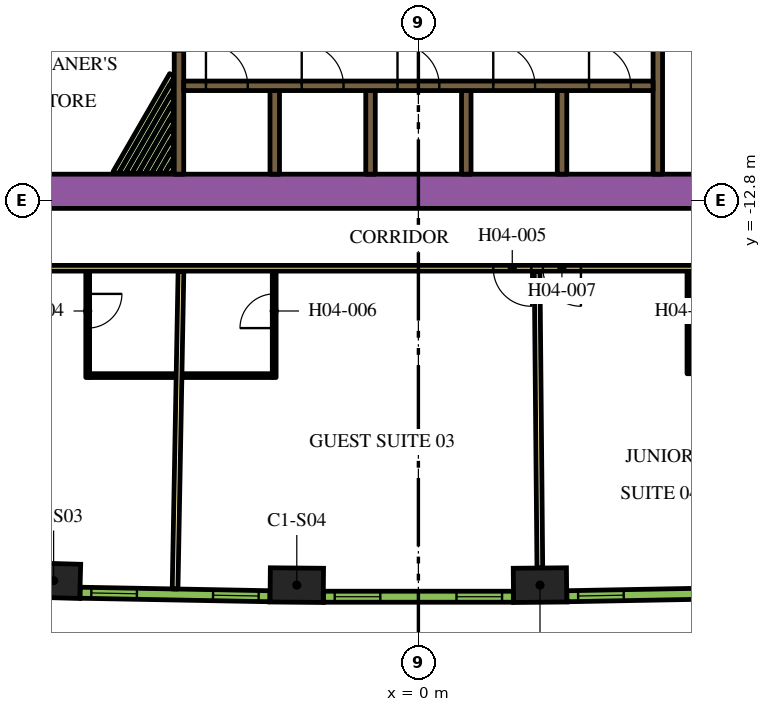
"""IFC4 building model, lengths in metres.
Left out: names, types, materials, properties, quantities, classifications, styles, units other than length and angle.
Written with IfcOpenShell. Run it as: python <this file> out.ifc"""

import sys

from ifc_helpers import new_model, si_unit, direction, frame, frame_2d, origin, origin_2d, place, context, subcontext, project, spatial, rectangle, extrude, element, fill, save


model = new_model("IFC4")
c1 = context("Model", 3, precision=1e-05, world=origin(), true_north=direction((0.0, 1.0)))
c2 = subcontext(c1, "Body", "Model", "MODEL_VIEW")
j1 = project(units=[si_unit("LENGTHUNIT", "METRE"), si_unit("PLANEANGLEUNIT", "RADIAN")], contexts=[c1])
p1 = place(None, origin())
s1 = spatial("IfcSite", under=j1, at=p1, CompositionType="ELEMENT")
p2 = place(p1, origin())
s2 = spatial("IfcBuilding", under=s1, at=p2, CompositionType="ELEMENT")
p3 = place(p2, frame((0.0, 0.0, 66.6)))
s3 = spatial("IfcBuildingStorey", under=s2, at=p3, CompositionType="ELEMENT", Elevation=66.6)
for number, where, z_axis, x_axis in (
    (1, (-9.599, -22.795, 0.0), (0.0, 0.0, 1.0), (1.0, -0.028, 0.0)),
    (2, (-3.2, -22.913, 0.0), (0.0, 0.0, 1.0), (1.0, -0.009, 0.0)),
    (3, (3.2, -22.913, 0.0), (0.0, 0.0, 1.0), (1.0, 0.009, 0.0)),
):
    element("IfcColumn", number, at=place(p3, frame(where, z_axis=z_axis, x_axis=x_axis)), inside=s3, PredefinedType="COLUMN", context=c2, shape_type="SweptSolid", body=[
        extrude(rectangle(XDim=1.4, YDim=0.9, at=origin_2d()), origin(), (0.0, 0.0, 1.0), 3.9),
    ])
p4 = place(p3, frame((-12.019, -12.55, 0.0), z_axis=(0.0, 0.0, 1.0), x_axis=(1.0, 0.0, 0.0)))
e4 = element("IfcWall", 4, at=p4, inside=s3, PredefinedType="SOLIDWALL", context=c2, shape_type="SweptSolid", body=[
    extrude(rectangle(XDim=21.63, YDim=0.9, at=frame_2d((10.815, 0.0))), origin(), (0.0, 0.0, 1.0), 3.9),
])
p5 = place(p3, frame((12.84, -9.261, 0.0), z_axis=(0.0, 0.0, 1.0), x_axis=(-0.866013990052, 0.500019768644, 0.0)))
e5 = element("IfcWall", 5, at=p5, inside=s3, PredefinedType="SOLIDWALL", context=c2, shape_type="SweptSolid", body=[
    extrude(rectangle(XDim=6.8, YDim=0.25, at=frame_2d((3.4, 0.0))), origin(), (0.0, 0.0, 1.0), 3.9),
])
p6 = place(p3, frame((-12.84, -9.261, 0.0), z_axis=(0.0, 0.0, 1.0), x_axis=(0.866016039709, 0.500016218704, 0.0)))
e6 = element("IfcWall", 6, at=p6, inside=s3, PredefinedType="SOLIDWALL", context=c2, shape_type="SweptSolid", body=[
    extrude(rectangle(XDim=7.05, YDim=0.25, at=frame_2d((3.525, 0.0))), origin(), (0.0, 0.0, 1.0), 3.9),
])
p7 = place(p3, frame((-3.78, -12.1, 0.0), z_axis=(0.0, 0.0, 1.0), x_axis=(0.0, 1.0, 0.0)))
e7 = element("IfcWall", 7, at=p7, inside=s3, PredefinedType="SOLIDWALL", context=c2, shape_type="SweptSolid", body=[
    extrude(rectangle(XDim=2.2, YDim=0.25, at=frame_2d((1.1, 0.0))), origin(), (0.0, 0.0, 1.0), 3.9),
])
p8 = place(p3, frame((-6.3, -12.1, 0.0), z_axis=(0.0, 0.0, 1.0), x_axis=(0.0, 1.0, 0.0)))
e8 = element("IfcWall", 8, at=p8, inside=s3, PredefinedType="SOLIDWALL", context=c2, shape_type="SweptSolid", body=[
    extrude(rectangle(XDim=3.265, YDim=0.25, at=frame_2d((1.632, 0.0))), origin(), (0.0, 0.0, 1.0), 3.9),
])
p9 = place(p3, frame((6.3, -12.1, 0.0), z_axis=(0.0, 0.0, 1.0), x_axis=(0.0, 1.0, 0.0)))
e9 = element("IfcWall", 9, at=p9, inside=s3, PredefinedType="SOLIDWALL", context=c2, shape_type="SweptSolid", body=[
    extrude(rectangle(XDim=3.428, YDim=0.25, at=frame_2d((1.714, 0.0))), origin(), (0.0, 0.0, 1.0), 3.9),
])
for number, where, z_axis, x_axis in (
    (10, (3.78, -12.1, 0.0), (0.0, 0.0, 1.0), (0.0, 1.0, 0.0)),
    (11, (1.26, -12.1, 0.0), (0.0, 0.0, 1.0), (0.0, 1.0, 0.0)),
    (12, (-1.26, -12.1, 0.0), (0.0, 0.0, 1.0), (0.0, 1.0, 0.0)),
):
    element("IfcWall", number, at=place(p3, frame(where, z_axis=z_axis, x_axis=x_axis)), inside=s3, PredefinedType="SOLIDWALL", context=c2, shape_type="SweptSolid", body=[
        extrude(rectangle(XDim=2.2, YDim=0.25, at=frame_2d((1.1, 0.0))), origin(), (0.0, 0.0, 1.0), 3.9),
    ])
p10 = place(p3, frame((-7.968, -12.068, 0.0), z_axis=(0.0, 0.0, 1.0), x_axis=(0.500013701029, 0.866017493347, 0.0)))
e13 = element("IfcWall", 13, at=p10, inside=s3, PredefinedType="PARTITIONING", context=c2, shape_type="SweptSolid", body=[
    extrude(rectangle(XDim=2.975, YDim=0.15, at=frame_2d((1.488, 0.0))), origin(), (0.0, 0.0, 1.0), 2.75),
])
p11 = place(p3, frame((-7.794, -12.068, 0.0), z_axis=(0.0, 0.0, 1.0), x_axis=(0.499985098601, 0.86603400694, 0.0)))
e14 = element("IfcWall", 14, at=p11, inside=s3, PredefinedType="PARTITIONING", context=c2, shape_type="SweptSolid", body=[
    extrude(rectangle(XDim=2.628, YDim=0.15, at=frame_2d((1.314, 0.0))), origin(), (0.0, 0.0, 1.0), 2.75),
])
p12 = place(p3, frame((-7.621, -12.068, 0.0), z_axis=(0.0, 0.0, 1.0), x_axis=(0.500028047758, 0.866009209798, 0.0)))
e15 = element("IfcWall", 15, at=p12, inside=s3, PredefinedType="PARTITIONING", context=c2, shape_type="SweptSolid", body=[
    extrude(rectangle(XDim=2.282, YDim=0.15, at=frame_2d((1.141, 0.0))), origin(), (0.0, 0.0, 1.0), 2.75),
])
p13 = place(p3, frame((-7.448, -12.068, 0.0), z_axis=(0.0, 0.0, 1.0), x_axis=(0.500031751504, 0.866007071269, 0.0)))
e16 = element("IfcWall", 16, at=p13, inside=s3, PredefinedType="PARTITIONING", context=c2, shape_type="SweptSolid", body=[
    extrude(rectangle(XDim=1.936, YDim=0.15, at=frame_2d((0.968, 0.0))), origin(), (0.0, 0.0, 1.0), 2.75),
])
p14 = place(p3, frame((-7.275, -12.068, 0.0), z_axis=(0.0, 0.0, 1.0), x_axis=(0.499988385283, 0.86603210944, 0.0)))
e17 = element("IfcWall", 17, at=p14, inside=s3, PredefinedType="PARTITIONING", context=c2, shape_type="SweptSolid", body=[
    extrude(rectangle(XDim=1.589, YDim=0.15, at=frame_2d((0.795, 0.0))), origin(), (0.0, 0.0, 1.0), 2.75),
])
p15 = place(p3, frame((-7.102, -12.068, 0.0), z_axis=(0.0, 0.0, 1.0), x_axis=(0.500068153333, 0.865986051864, 0.0)))
e18 = element("IfcWall", 18, at=p15, inside=s3, PredefinedType="PARTITIONING", context=c2, shape_type="SweptSolid", body=[
    extrude(rectangle(XDim=1.243, YDim=0.15, at=frame_2d((0.622, 0.0))), origin(), (0.0, 0.0, 1.0), 2.75),
])
p16 = place(p3, frame((-6.928, -12.068, 0.0), z_axis=(0.0, 0.0, 1.0), x_axis=(0.500005339912, 0.866022320763, 0.0)))
e19 = element("IfcWall", 19, at=p16, inside=s3, PredefinedType="PARTITIONING", context=c2, shape_type="SweptSolid", body=[
    extrude(rectangle(XDim=0.896, YDim=0.15, at=frame_2d((0.448, 0.0))), origin(), (0.0, 0.0, 1.0), 2.75),
])
p17 = place(p3, frame((-6.755, -12.068, 0.0), z_axis=(0.0, 0.0, 1.0), x_axis=(0.500196256984, 0.865912065108, 0.0)))
e20 = element("IfcWall", 20, at=p17, inside=s3, PredefinedType="PARTITIONING", context=c2, shape_type="SweptSolid", body=[
    extrude(rectangle(XDim=0.55, YDim=0.15, at=frame_2d((0.275, 0.0))), origin(), (0.0, 0.0, 1.0), 2.75),
])
p18 = place(p3, frame((-6.582, -12.068, 0.0), z_axis=(0.0, 0.0, 1.0), x_axis=(0.499618727529, 0.866245419672, 0.0)))
e21 = element("IfcWall", 21, at=p18, inside=s3, PredefinedType="PARTITIONING", context=c2, shape_type="SweptSolid", body=[
    extrude(rectangle(XDim=0.204, YDim=0.15, at=frame_2d((0.102, 0.0))), origin(), (0.0, 0.0, 1.0), 2.75),
])
p19 = place(p3, frame((-6.175, -9.775, 0.0), z_axis=(0.0, 0.0, 1.0), x_axis=(1.0, 0.0, 0.0)))
e22 = element("IfcWall", 22, at=p19, inside=s3, PredefinedType="SOLIDWALL", context=c2, shape_type="SweptSolid", body=[
    extrude(rectangle(XDim=12.35, YDim=0.25, at=frame_2d((6.175, 0.0))), origin(), (0.0, 0.0, 1.0), 3.9),
])
p20 = place(p19, frame((0.585, 0.0, 0.0)))
e23 = element("IfcOpeningElement", 23, at=p20, cuts=e22, PredefinedType="OPENING", context=c2, shape_type="SweptSolid", body=[
    extrude(rectangle(XDim=1.1, YDim=2.1, at=frame_2d((0.55, 1.05))), frame((0.0, 0.135, 0.0), z_axis=(0.0, -1.0, 0.0), x_axis=(1.0, 0.0, 0.0)), (0.0, 0.0, 1.0), 0.27),
])
p21 = place(p19, frame((3.105, 0.0, 0.0)))
e24 = element("IfcOpeningElement", 24, at=p21, cuts=e22, PredefinedType="OPENING", context=c2, shape_type="SweptSolid", body=[
    extrude(rectangle(XDim=1.1, YDim=2.1, at=frame_2d((0.55, 1.05))), frame((0.0, 0.135, 0.0), z_axis=(0.0, -1.0, 0.0), x_axis=(1.0, 0.0, 0.0)), (0.0, 0.0, 1.0), 0.27),
])
p22 = place(p19, frame((5.625, 0.0, 0.0)))
e25 = element("IfcOpeningElement", 25, at=p22, cuts=e22, PredefinedType="OPENING", context=c2, shape_type="SweptSolid", body=[
    extrude(rectangle(XDim=1.1, YDim=2.1, at=frame_2d((0.55, 1.05))), frame((0.0, 0.135, 0.0), z_axis=(0.0, -1.0, 0.0), x_axis=(1.0, 0.0, 0.0)), (0.0, 0.0, 1.0), 0.27),
])
p23 = place(p19, frame((8.145, 0.0, 0.0)))
e26 = element("IfcOpeningElement", 26, at=p23, cuts=e22, PredefinedType="OPENING", context=c2, shape_type="SweptSolid", body=[
    extrude(rectangle(XDim=1.1, YDim=2.1, at=frame_2d((0.55, 1.05))), frame((0.0, 0.135, 0.0), z_axis=(0.0, -1.0, 0.0), x_axis=(1.0, 0.0, 0.0)), (0.0, 0.0, 1.0), 0.27),
])
p24 = place(p19, frame((10.665, 0.0, 0.0)))
e27 = element("IfcOpeningElement", 27, at=p24, cuts=e22, PredefinedType="OPENING", context=c2, shape_type="SweptSolid", body=[
    extrude(rectangle(XDim=1.1, YDim=2.1, at=frame_2d((0.55, 1.05))), frame((0.0, 0.135, 0.0), z_axis=(0.0, -1.0, 0.0), x_axis=(1.0, 0.0, 0.0)), (0.0, 0.0, 1.0), 0.27),
])
p25 = place(p3, frame((12.918, -14.575, 0.0), z_axis=(0.0, 0.0, 1.0), x_axis=(-1.0, 0.0, 0.0)))
e28 = element("IfcWall", 28, at=p25, inside=s3, PredefinedType="PARTITIONING", context=c2, shape_type="SweptSolid", body=[
    extrude(rectangle(XDim=25.766, YDim=0.15, at=frame_2d((12.883, 0.0))), origin(), (0.0, 0.0, 1.0), 2.75),
])
p26 = place(p25, frame((24.586, 0.0, 0.0)))
e29 = element("IfcOpeningElement", 29, at=p26, cuts=e28, PredefinedType="OPENING", context=c2, shape_type="SweptSolid", body=[
    extrude(rectangle(XDim=1.0, YDim=2.1, at=frame_2d((0.5, 1.05))), frame((0.0, 0.085, 0.0), z_axis=(0.0, -1.0, 0.0), x_axis=(1.0, 0.0, 0.0)), (0.0, 0.0, 1.0), 0.17),
])
p27 = place(p25, frame((9.948, 0.0, 0.0)))
e30 = element("IfcOpeningElement", 30, at=p27, cuts=e28, PredefinedType="OPENING", context=c2, shape_type="SweptSolid", body=[
    extrude(rectangle(XDim=1.0, YDim=2.1, at=frame_2d((0.5, 1.05))), frame((0.0, 0.085, 0.0), z_axis=(0.0, -1.0, 0.0), x_axis=(1.0, 0.0, 0.0)), (0.0, 0.0, 1.0), 0.17),
])
p28 = place(p25, frame((8.642, 0.0, 0.0)))
e31 = element("IfcOpeningElement", 31, at=p28, cuts=e28, PredefinedType="OPENING", context=c2, shape_type="SweptSolid", body=[
    extrude(rectangle(XDim=1.0, YDim=2.1, at=frame_2d((0.5, 1.05))), frame((0.0, 0.085, 0.0), z_axis=(0.0, -1.0, 0.0), x_axis=(1.0, 0.0, 0.0)), (0.0, 0.0, 1.0), 0.17),
])
p29 = place(p25, frame((0.18, 0.0, 0.0)))
e32 = element("IfcOpeningElement", 32, at=p29, cuts=e28, PredefinedType="OPENING", context=c2, shape_type="SweptSolid", body=[
    extrude(rectangle(XDim=1.0, YDim=2.1, at=frame_2d((0.5, 1.05))), frame((0.0, 0.085, 0.0), z_axis=(0.0, -1.0, 0.0), x_axis=(1.0, 0.0, 0.0)), (0.0, 0.0, 1.0), 0.17),
])
p30 = place(p3, frame((-6.402, -23.014, 0.0), z_axis=(0.0, 0.0, 1.0), x_axis=(0.01849587109, 0.999828936745, 0.0)))
e33 = element("IfcWall", 33, at=p30, inside=s3, PredefinedType="PARTITIONING", context=c2, shape_type="SweptSolid", body=[
    extrude(rectangle(XDim=8.355, YDim=0.15, at=frame_2d((4.178, 0.0))), origin(), (0.0, 0.0, 1.0), 2.75),
])
p31 = place(p3, frame((3.196, -22.463, 0.0), z_axis=(0.0, 0.0, 1.0), x_axis=(-0.00926060032, 0.999957119721, 0.0)))
e34 = element("IfcWall", 34, at=p31, inside=s3, PredefinedType="PARTITIONING", context=c2, shape_type="SweptSolid", body=[
    extrude(rectangle(XDim=7.803, YDim=0.15, at=frame_2d((3.902, 0.0))), origin(), (0.0, 0.0, 1.0), 2.75),
])
p32 = place(p3, frame((-8.702, -14.65, 0.0), z_axis=(0.0, 0.0, 1.0), x_axis=(0.0, -1.0, 0.0)))
e35 = element("IfcWall", 35, at=p32, inside=s3, PredefinedType="PARTITIONING", context=c2, shape_type="SweptSolid", body=[
    extrude(rectangle(XDim=2.8, YDim=0.1, at=frame_2d((1.4, 0.0))), origin(), (0.0, 0.0, 1.0), 2.75),
])
p33 = place(p32, frame((0.6, 0.0, 0.0)))
e36 = element("IfcOpeningElement", 36, at=p33, cuts=e35, PredefinedType="OPENING", context=c2, shape_type="SweptSolid", body=[
    extrude(rectangle(XDim=0.9, YDim=2.1, at=frame_2d((0.45, 1.05))), frame((0.0, 0.06, 0.0), z_axis=(0.0, -1.0, 0.0), x_axis=(1.0, 0.0, 0.0)), (0.0, 0.0, 1.0), 0.12),
])
p34 = place(p3, frame((-8.652, -17.4, 0.0), z_axis=(0.0, 0.0, 1.0), x_axis=(1.0, 0.0, 0.0)))
e37 = element("IfcWall", 37, at=p34, inside=s3, PredefinedType="PARTITIONING", context=c2, shape_type="SweptSolid", body=[
    extrude(rectangle(XDim=2.27, YDim=0.1, at=frame_2d((1.135, 0.0))), origin(), (0.0, 0.0, 1.0), 2.75),
])
p35 = place(p3, frame((-3.794, -17.45, 0.0), z_axis=(0.0, 0.0, 1.0), x_axis=(0.0, 1.0, 0.0)))
e38 = element("IfcWall", 38, at=p35, inside=s3, PredefinedType="PARTITIONING", context=c2, shape_type="SweptSolid", body=[
    extrude(rectangle(XDim=2.8, YDim=0.1, at=frame_2d((1.4, 0.0))), origin(), (0.0, 0.0, 1.0), 2.75),
])
p36 = place(p35, frame((1.3, 0.0, 0.0)))
e39 = element("IfcOpeningElement", 39, at=p36, cuts=e38, PredefinedType="OPENING", context=c2, shape_type="SweptSolid", body=[
    extrude(rectangle(XDim=0.9, YDim=2.1, at=frame_2d((0.45, 1.05))), frame((0.0, 0.06, 0.0), z_axis=(0.0, -1.0, 0.0), x_axis=(1.0, 0.0, 0.0)), (0.0, 0.0, 1.0), 0.12),
])
p37 = place(p3, frame((-3.844, -17.4, 0.0), z_axis=(0.0, 0.0, 1.0), x_axis=(-1.0, 0.0, 0.0)))
e40 = element("IfcWall", 40, at=p37, inside=s3, PredefinedType="PARTITIONING", context=c2, shape_type="SweptSolid", body=[
    extrude(rectangle(XDim=2.37, YDim=0.1, at=frame_2d((1.185, 0.0))), origin(), (0.0, 0.0, 1.0), 2.75),
])
p38 = place(p3, frame((7.119, -14.65, 0.0), z_axis=(0.0, 0.0, 1.0), x_axis=(0.0, -1.0, 0.0)))
e41 = element("IfcWall", 41, at=p38, inside=s3, PredefinedType="PARTITIONING", context=c2, shape_type="SweptSolid", body=[
    extrude(rectangle(XDim=2.7, YDim=0.1, at=frame_2d((1.35, 0.0))), origin(), (0.0, 0.0, 1.0), 2.75),
])
p39 = place(p38, frame((0.6, 0.0, 0.0)))
e42 = element("IfcOpeningElement", 42, at=p39, cuts=e41, PredefinedType="OPENING", context=c2, shape_type="SweptSolid", body=[
    extrude(rectangle(XDim=0.9, YDim=2.1, at=frame_2d((0.45, 1.05))), frame((0.0, 0.06, 0.0), z_axis=(0.0, -1.0, 0.0), x_axis=(1.0, 0.0, 0.0)), (0.0, 0.0, 1.0), 0.12),
])
p40 = place(p3, frame((7.169, -17.3, 0.0), z_axis=(0.0, 0.0, 1.0), x_axis=(1.0, 0.0, 0.0)))
e43 = element("IfcWall", 43, at=p40, inside=s3, PredefinedType="PARTITIONING", context=c2, shape_type="SweptSolid", body=[
    extrude(rectangle(XDim=2.2, YDim=0.1, at=frame_2d((1.1, 0.0))), origin(), (0.0, 0.0, 1.0), 2.75),
])
p41 = place(p3, frame((-8.904, -23.113, 0.0), z_axis=(0.0, 0.0, 1.0), x_axis=(0.999829529479, -0.018463801951, 0.0)))
e44 = element("IfcWall", 44, at=p41, inside=s3, PredefinedType="SOLIDWALL", context=c2, shape_type="SweptSolid", body=[
    extrude(rectangle(XDim=4.998, YDim=0.29, at=frame_2d((2.499, 0.0))), origin(), (0.0, 0.0, 1.0), 3.65),
])
p42 = place(p41, frame((0.297, 0.0, 0.9)))
e45 = element("IfcOpeningElement", 45, at=p42, cuts=e44, PredefinedType="OPENING", context=c2, shape_type="SweptSolid", body=[
    extrude(rectangle(XDim=1.2, YDim=2.15, at=frame_2d((0.6, 1.075))), frame((0.0, 0.155, 0.0), z_axis=(0.0, -1.0, 0.0), x_axis=(1.0, 0.0, 0.0)), (0.0, 0.0, 1.0), 0.31),
])
p43 = place(p41, frame((3.501, 0.0, 0.9)))
e46 = element("IfcOpeningElement", 46, at=p43, cuts=e44, PredefinedType="OPENING", context=c2, shape_type="SweptSolid", body=[
    extrude(rectangle(XDim=1.2, YDim=2.15, at=frame_2d((0.6, 1.075))), frame((0.0, 0.155, 0.0), z_axis=(0.0, -1.0, 0.0), x_axis=(1.0, 0.0, 0.0)), (0.0, 0.0, 1.0), 0.31),
])
p44 = place(p3, frame((-2.499, -23.218, 0.0), z_axis=(0.0, 0.0, 1.0), x_axis=(1.0, 0.0, 0.0)))
e47 = element("IfcWall", 47, at=p44, inside=s3, PredefinedType="SOLIDWALL", context=c2, shape_type="SweptSolid", body=[
    extrude(rectangle(XDim=4.998, YDim=0.29, at=frame_2d((2.499, 0.0))), origin(), (0.0, 0.0, 1.0), 3.65),
])
p45 = place(p44, frame((0.297, 0.0, 0.9)))
e48 = element("IfcOpeningElement", 48, at=p45, cuts=e47, PredefinedType="OPENING", context=c2, shape_type="SweptSolid", body=[
    extrude(rectangle(XDim=1.2, YDim=2.15, at=frame_2d((0.6, 1.075))), frame((0.0, 0.155, 0.0), z_axis=(0.0, -1.0, 0.0), x_axis=(1.0, 0.0, 0.0)), (0.0, 0.0, 1.0), 0.31),
])
p46 = place(p44, frame((3.501, 0.0, 0.9)))
e49 = element("IfcOpeningElement", 49, at=p46, cuts=e47, PredefinedType="OPENING", context=c2, shape_type="SweptSolid", body=[
    extrude(rectangle(XDim=1.2, YDim=2.15, at=frame_2d((0.6, 1.075))), frame((0.0, 0.155, 0.0), z_axis=(0.0, -1.0, 0.0), x_axis=(1.0, 0.0, 0.0)), (0.0, 0.0, 1.0), 0.31),
])
p47 = place(p3, frame((3.906, -23.205, 0.0), z_axis=(0.0, 0.0, 1.0), x_axis=(0.999829529479, 0.018463801951, 0.0)))
e50 = element("IfcWall", 50, at=p47, inside=s3, PredefinedType="SOLIDWALL", context=c2, shape_type="SweptSolid", body=[
    extrude(rectangle(XDim=4.998, YDim=0.29, at=frame_2d((2.499, 0.0))), origin(), (0.0, 0.0, 1.0), 3.65),
])
p48 = place(p47, frame((0.297, 0.0, 0.9)))
e51 = element("IfcOpeningElement", 51, at=p48, cuts=e50, PredefinedType="OPENING", context=c2, shape_type="SweptSolid", body=[
    extrude(rectangle(XDim=1.2, YDim=2.15, at=frame_2d((0.6, 1.075))), frame((0.0, 0.155, 0.0), z_axis=(0.0, -1.0, 0.0), x_axis=(1.0, 0.0, 0.0)), (0.0, 0.0, 1.0), 0.31),
])
p49 = place(p47, frame((3.501, 0.0, 0.9)))
e52 = element("IfcOpeningElement", 52, at=p49, cuts=e50, PredefinedType="OPENING", context=c2, shape_type="SweptSolid", body=[
    extrude(rectangle(XDim=1.2, YDim=2.15, at=frame_2d((0.6, 1.075))), frame((0.0, 0.155, 0.0), z_axis=(0.0, -1.0, 0.0), x_axis=(1.0, 0.0, 0.0)), (0.0, 0.0, 1.0), 0.31),
])
p50 = place(p20, origin())
e53 = element("IfcDoor", 53, at=p50, inside=s3, OperationType="DOUBLE_DOOR_SLIDING", PredefinedType="DOOR", context=c2, shape_type="SweptSolid", body=[
    extrude(rectangle(XDim=1.1, YDim=2.1, at=frame_2d((0.55, 1.05))), frame((0.0, 0.025, 0.0), z_axis=(0.0, -1.0, 0.0), x_axis=(1.0, 0.0, 0.0)), (0.0, 0.0, 1.0), 0.05),
])
fill(e23, e53)
p51 = place(p21, origin())
e54 = element("IfcDoor", 54, at=p51, inside=s3, OperationType="DOUBLE_DOOR_SLIDING", PredefinedType="DOOR", context=c2, shape_type="SweptSolid", body=[
    extrude(rectangle(XDim=1.1, YDim=2.1, at=frame_2d((0.55, 1.05))), frame((0.0, 0.025, 0.0), z_axis=(0.0, -1.0, 0.0), x_axis=(1.0, 0.0, 0.0)), (0.0, 0.0, 1.0), 0.05),
])
fill(e24, e54)
p52 = place(p22, origin())
e55 = element("IfcDoor", 55, at=p52, inside=s3, OperationType="DOUBLE_DOOR_SLIDING", PredefinedType="DOOR", context=c2, shape_type="SweptSolid", body=[
    extrude(rectangle(XDim=1.1, YDim=2.1, at=frame_2d((0.55, 1.05))), frame((0.0, 0.025, 0.0), z_axis=(0.0, -1.0, 0.0), x_axis=(1.0, 0.0, 0.0)), (0.0, 0.0, 1.0), 0.05),
])
fill(e25, e55)
p53 = place(p23, origin())
e56 = element("IfcDoor", 56, at=p53, inside=s3, OperationType="DOUBLE_DOOR_SLIDING", PredefinedType="DOOR", context=c2, shape_type="SweptSolid", body=[
    extrude(rectangle(XDim=1.1, YDim=2.1, at=frame_2d((0.55, 1.05))), frame((0.0, 0.025, 0.0), z_axis=(0.0, -1.0, 0.0), x_axis=(1.0, 0.0, 0.0)), (0.0, 0.0, 1.0), 0.05),
])
fill(e26, e56)
p54 = place(p24, origin())
e57 = element("IfcDoor", 57, at=p54, inside=s3, OperationType="DOUBLE_DOOR_SLIDING", PredefinedType="DOOR", context=c2, shape_type="SweptSolid", body=[
    extrude(rectangle(XDim=1.1, YDim=2.1, at=frame_2d((0.55, 1.05))), frame((0.0, 0.025, 0.0), z_axis=(0.0, -1.0, 0.0), x_axis=(1.0, 0.0, 0.0)), (0.0, 0.0, 1.0), 0.05),
])
fill(e27, e57)
p55 = place(p33, origin())
e58 = element("IfcDoor", 58, at=p55, inside=s3, OperationType="SINGLE_SWING_LEFT", PredefinedType="DOOR", context=c2, shape_type="SweptSolid", body=[
    extrude(rectangle(XDim=0.9, YDim=2.1, at=frame_2d((0.45, 1.05))), frame((0.0, 0.025, 0.0), z_axis=(0.0, -1.0, 0.0), x_axis=(1.0, 0.0, 0.0)), (0.0, 0.0, 1.0), 0.05),
])
fill(e36, e58)
p56 = place(p27, origin())
e59 = element("IfcDoor", 59, at=p56, inside=s3, OperationType="SINGLE_SWING_LEFT", PredefinedType="DOOR", context=c2, shape_type="SweptSolid", body=[
    extrude(rectangle(XDim=1.0, YDim=2.1, at=frame_2d((0.5, 1.05))), frame((0.0, 0.025, 0.0), z_axis=(0.0, -1.0, 0.0), x_axis=(1.0, 0.0, 0.0)), (0.0, 0.0, 1.0), 0.05),
])
fill(e30, e59)
p57 = place(p36, origin())
e60 = element("IfcDoor", 60, at=p57, inside=s3, OperationType="SINGLE_SWING_RIGHT", PredefinedType="DOOR", context=c2, shape_type="SweptSolid", body=[
    extrude(rectangle(XDim=0.9, YDim=2.1, at=frame_2d((0.45, 1.05))), frame((0.0, 0.025, 0.0), z_axis=(0.0, -1.0, 0.0), x_axis=(1.0, 0.0, 0.0)), (0.0, 0.0, 1.0), 0.05),
])
fill(e39, e60)
p58 = place(p28, origin())
e61 = element("IfcDoor", 61, at=p58, inside=s3, OperationType="SINGLE_SWING_RIGHT", PredefinedType="DOOR", context=c2, shape_type="SweptSolid", body=[
    extrude(rectangle(XDim=1.0, YDim=2.1, at=frame_2d((0.5, 1.05))), frame((0.0, 0.025, 0.0), z_axis=(0.0, -1.0, 0.0), x_axis=(1.0, 0.0, 0.0)), (0.0, 0.0, 1.0), 0.05),
])
fill(e31, e61)
p59 = place(p39, origin())
e62 = element("IfcDoor", 62, at=p59, inside=s3, OperationType="SINGLE_SWING_LEFT", PredefinedType="DOOR", context=c2, shape_type="SweptSolid", body=[
    extrude(rectangle(XDim=0.9, YDim=2.1, at=frame_2d((0.45, 1.05))), frame((0.0, 0.025, 0.0), z_axis=(0.0, -1.0, 0.0), x_axis=(1.0, 0.0, 0.0)), (0.0, 0.0, 1.0), 0.05),
])
fill(e42, e62)
p60 = place(p42, origin())
e63 = element("IfcWindow", 63, at=p60, inside=s3, PartitioningType="DOUBLE_PANEL_VERTICAL", PredefinedType="WINDOW", context=c2, shape_type="SweptSolid", body=[
    extrude(rectangle(XDim=1.2, YDim=2.15, at=frame_2d((0.6, 1.075))), frame((0.0, 0.015, 0.0), z_axis=(0.0, -1.0, 0.0), x_axis=(1.0, 0.0, 0.0)), (0.0, 0.0, 1.0), 0.06),
])
fill(e45, e63)
p61 = place(p43, origin())
e64 = element("IfcWindow", 64, at=p61, inside=s3, PartitioningType="DOUBLE_PANEL_VERTICAL", PredefinedType="WINDOW", context=c2, shape_type="SweptSolid", body=[
    extrude(rectangle(XDim=1.2, YDim=2.15, at=frame_2d((0.6, 1.075))), frame((0.0, 0.015, 0.0), z_axis=(0.0, -1.0, 0.0), x_axis=(1.0, 0.0, 0.0)), (0.0, 0.0, 1.0), 0.06),
])
fill(e46, e64)
p62 = place(p45, origin())
e65 = element("IfcWindow", 65, at=p62, inside=s3, PartitioningType="DOUBLE_PANEL_VERTICAL", PredefinedType="WINDOW", context=c2, shape_type="SweptSolid", body=[
    extrude(rectangle(XDim=1.2, YDim=2.15, at=frame_2d((0.6, 1.075))), frame((0.0, 0.015, 0.0), z_axis=(0.0, -1.0, 0.0), x_axis=(1.0, 0.0, 0.0)), (0.0, 0.0, 1.0), 0.06),
])
fill(e48, e65)
p63 = place(p46, origin())
e66 = element("IfcWindow", 66, at=p63, inside=s3, PartitioningType="DOUBLE_PANEL_VERTICAL", PredefinedType="WINDOW", context=c2, shape_type="SweptSolid", body=[
    extrude(rectangle(XDim=1.2, YDim=2.15, at=frame_2d((0.6, 1.075))), frame((0.0, 0.015, 0.0), z_axis=(0.0, -1.0, 0.0), x_axis=(1.0, 0.0, 0.0)), (0.0, 0.0, 1.0), 0.06),
])
fill(e49, e66)
p64 = place(p48, origin())
e67 = element("IfcWindow", 67, at=p64, inside=s3, PartitioningType="DOUBLE_PANEL_VERTICAL", PredefinedType="WINDOW", context=c2, shape_type="SweptSolid", body=[
    extrude(rectangle(XDim=1.2, YDim=2.15, at=frame_2d((0.6, 1.075))), frame((0.0, 0.015, 0.0), z_axis=(0.0, -1.0, 0.0), x_axis=(1.0, 0.0, 0.0)), (0.0, 0.0, 1.0), 0.06),
])
fill(e51, e67)
save(model, sys.argv[1])
